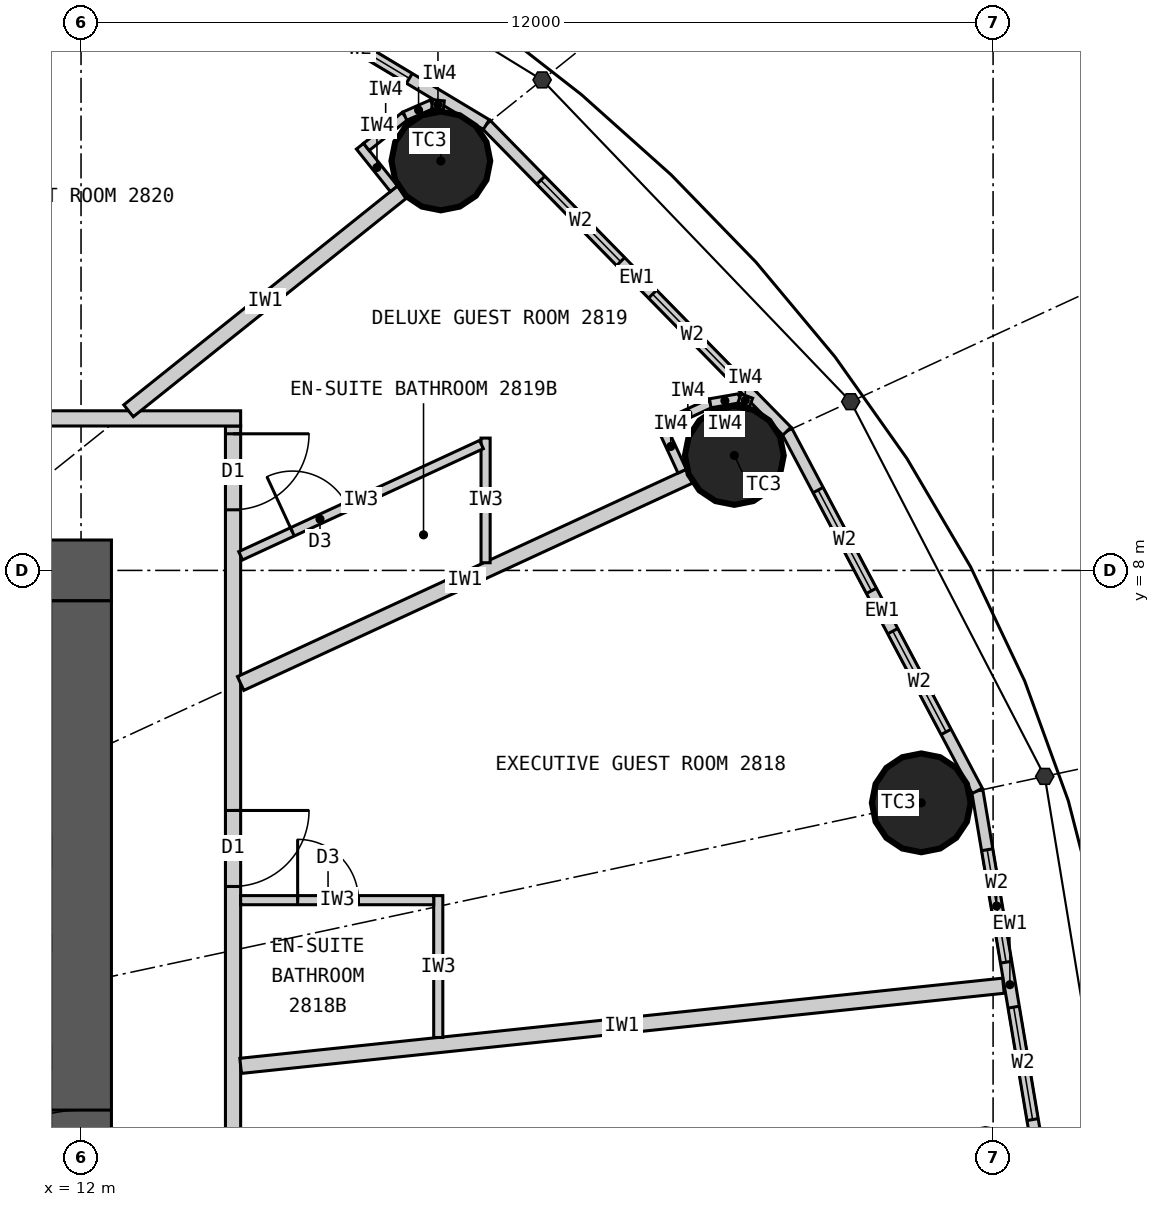
"""IFC4 building model, lengths in metres.
Left out: names, types, materials, properties, quantities, classifications, styles, units other than length and angle.
Written with IfcOpenShell. Run it as: python <this file> out.ifc"""

import sys

from ifc_helpers import new_model, si_unit, direction, frame, frame_2d, origin, origin_2d, place, context, subcontext, project, spatial, rectangle, circle, extrude, element, fill, save


model = new_model("IFC4")
c1 = context("Model", 3, precision=1e-05, world=origin(), true_north=direction((0.0, 1.0)))
c2 = subcontext(c1, "Body", "Model", "MODEL_VIEW")
j1 = project(units=[si_unit("LENGTHUNIT", "METRE"), si_unit("PLANEANGLEUNIT", "RADIAN")], contexts=[c1])
p1 = place(None, origin())
s1 = spatial("IfcSite", under=j1, at=p1, CompositionType="ELEMENT")
p2 = place(p1, origin())
s2 = spatial("IfcBuilding", under=s1, at=p2, CompositionType="ELEMENT")
p3 = place(p2, frame((0.0, 0.0, 112.2)))
s3 = spatial("IfcBuildingStorey", under=s2, at=p3, CompositionType="ELEMENT", Elevation=112.2)
for number, where, z_axis, x_axis in (
    (1, (23.055, 4.942, 0.0), (0.0, 0.0, 1.0), (1.0, 0.0, 0.0)),
    (2, (20.596, 9.513, 0.0), (0.0, 0.0, 1.0), (1.0, 0.0, 0.0)),
    (3, (16.734, 13.387, 0.0), (0.0, 0.0, 1.0), (1.0, 0.0, 0.0)),
):
    element("IfcColumn", number, at=place(p3, frame(where, z_axis=z_axis, x_axis=x_axis)), inside=s3, PredefinedType="COLUMN", context=c2, shape_type="SweptSolid", body=[
        extrude(circle(Radius=0.65, at=origin_2d()), origin(), (0.0, 0.0, 1.0), 3.3),
    ])
p4 = place(p3, frame((-12.4, 8.0, 0.0), z_axis=(0.0, 0.0, 1.0), x_axis=(1.0, 0.0, 0.0)))
e4 = element("IfcWall", 4, at=p4, inside=s3, PredefinedType="SHEAR", context=c2, shape_type="SweptSolid", body=[
    extrude(rectangle(XDim=24.8, YDim=0.8, at=frame_2d((12.4, 0.0))), origin(), (0.0, 0.0, 1.0), 3.3),
])
p5 = place(p4, frame((11.1, 0.0, 0.0)))
e5 = element("IfcOpeningElement", 5, at=p5, cuts=e4, PredefinedType="OPENING", context=c2, shape_type="SweptSolid", body=[
    extrude(rectangle(XDim=1.2, YDim=2.2, at=frame_2d((0.6, 1.1))), frame((0.0, 0.41, 0.0), z_axis=(0.0, -1.0, 0.0), x_axis=(1.0, 0.0, 0.0)), (0.0, 0.0, 1.0), 0.82),
])
p6 = place(p4, frame((18.7, 0.0, 0.0)))
e6 = element("IfcOpeningElement", 6, at=p6, cuts=e4, PredefinedType="OPENING", context=c2, shape_type="SweptSolid", body=[
    extrude(rectangle(XDim=0.9, YDim=2.2, at=frame_2d((0.45, 1.1))), frame((0.0, 0.41, 0.0), z_axis=(0.0, -1.0, 0.0), x_axis=(1.0, 0.0, 0.0)), (0.0, 0.0, 1.0), 0.82),
])
p7 = place(p3, frame((12.0, -7.6, 0.0), z_axis=(0.0, 0.0, 1.0), x_axis=(0.0, 1.0, 0.0)))
e7 = element("IfcWall", 7, at=p7, inside=s3, PredefinedType="SHEAR", context=c2, shape_type="SweptSolid", body=[
    extrude(rectangle(XDim=15.2, YDim=0.8, at=frame_2d((7.6, 0.0))), origin(), (0.0, 0.0, 1.0), 3.3),
])
p8 = place(p7, frame((6.7, 0.0, 0.0)))
e8 = element("IfcOpeningElement", 8, at=p8, cuts=e7, PredefinedType="OPENING", context=c2, shape_type="SweptSolid", body=[
    extrude(rectangle(XDim=1.8, YDim=2.2, at=frame_2d((0.9, 1.1))), frame((0.0, 0.41, 0.0), z_axis=(0.0, -1.0, 0.0), x_axis=(1.0, 0.0, 0.0)), (0.0, 0.0, 1.0), 0.82),
])
p9 = place(p3, frame((24.65, 0.0, 0.0), z_axis=(0.0, 0.0, 1.0), x_axis=(-0.165883894218, 0.986145290329, 0.0)))
e9 = element("IfcWall", 9, at=p9, inside=s3, PredefinedType="ELEMENTEDWALL", context=c2, shape_type="SweptSolid", body=[
    extrude(rectangle(XDim=5.172, YDim=0.15, at=frame_2d((2.586, 0.0))), origin(), (0.0, 0.0, 1.0), 3.12),
])
p10 = place(p9, frame((0.786, 0.0, 0.9)))
e10 = element("IfcOpeningElement", 10, at=p10, cuts=e9, PredefinedType="OPENING", context=c2, shape_type="SweptSolid", body=[
    extrude(rectangle(XDim=1.5, YDim=1.9, at=frame_2d((0.75, 0.95))), frame((0.0, 0.085, 0.0), z_axis=(0.0, -1.0, 0.0), x_axis=(1.0, 0.0, 0.0)), (0.0, 0.0, 1.0), 0.17),
])
p11 = place(p9, frame((2.886, 0.0, 0.9)))
e11 = element("IfcOpeningElement", 11, at=p11, cuts=e9, PredefinedType="OPENING", context=c2, shape_type="SweptSolid", body=[
    extrude(rectangle(XDim=1.5, YDim=1.9, at=frame_2d((0.75, 0.95))), frame((0.0, 0.085, 0.0), z_axis=(0.0, -1.0, 0.0), x_axis=(1.0, 0.0, 0.0)), (0.0, 0.0, 1.0), 0.17),
])
p12 = place(p3, frame((23.792, 5.1, 0.0), z_axis=(0.0, 0.0, 1.0), x_axis=(-0.467814388454, 0.883826735257, 0.0)))
e12 = element("IfcWall", 12, at=p12, inside=s3, PredefinedType="ELEMENTEDWALL", context=c2, shape_type="SweptSolid", body=[
    extrude(rectangle(XDim=5.354, YDim=0.15, at=frame_2d((2.677, 0.0))), origin(), (0.0, 0.0, 1.0), 3.12),
])
p13 = place(p12, frame((0.877, 0.0, 0.9)))
e13 = element("IfcOpeningElement", 13, at=p13, cuts=e12, PredefinedType="OPENING", context=c2, shape_type="SweptSolid", body=[
    extrude(rectangle(XDim=1.5, YDim=1.9, at=frame_2d((0.75, 0.95))), frame((0.0, 0.085, 0.0), z_axis=(0.0, -1.0, 0.0), x_axis=(1.0, 0.0, 0.0)), (0.0, 0.0, 1.0), 0.17),
])
p14 = place(p12, frame((2.977, 0.0, 0.9)))
e14 = element("IfcOpeningElement", 14, at=p14, cuts=e12, PredefinedType="OPENING", context=c2, shape_type="SweptSolid", body=[
    extrude(rectangle(XDim=1.5, YDim=1.9, at=frame_2d((0.75, 0.95))), frame((0.0, 0.085, 0.0), z_axis=(0.0, -1.0, 0.0), x_axis=(1.0, 0.0, 0.0)), (0.0, 0.0, 1.0), 0.17),
])
p15 = place(p3, frame((21.287, 9.832, 0.0), z_axis=(0.0, 0.0, 1.0), x_axis=(-0.700136650834, 0.714008872605, 0.0)))
e15 = element("IfcWall", 15, at=p15, inside=s3, PredefinedType="ELEMENTEDWALL", context=c2, shape_type="SweptSolid", body=[
    extrude(rectangle(XDim=5.649, YDim=0.15, at=frame_2d((2.825, 0.0))), origin(), (0.0, 0.0, 1.0), 3.12),
])
p16 = place(p15, frame((1.025, 0.0, 0.9)))
e16 = element("IfcOpeningElement", 16, at=p16, cuts=e15, PredefinedType="OPENING", context=c2, shape_type="SweptSolid", body=[
    extrude(rectangle(XDim=1.5, YDim=1.9, at=frame_2d((0.75, 0.95))), frame((0.0, 0.085, 0.0), z_axis=(0.0, -1.0, 0.0), x_axis=(1.0, 0.0, 0.0)), (0.0, 0.0, 1.0), 0.17),
])
p17 = place(p15, frame((3.125, 0.0, 0.9)))
e17 = element("IfcOpeningElement", 17, at=p17, cuts=e15, PredefinedType="OPENING", context=c2, shape_type="SweptSolid", body=[
    extrude(rectangle(XDim=1.5, YDim=1.9, at=frame_2d((0.75, 0.95))), frame((0.0, 0.085, 0.0), z_axis=(0.0, -1.0, 0.0), x_axis=(1.0, 0.0, 0.0)), (0.0, 0.0, 1.0), 0.17),
])
p18 = place(p3, frame((17.332, 13.866, 0.0), z_axis=(0.0, 0.0, 1.0), x_axis=(-0.857308573723, 0.514802884044, 0.0)))
e18 = element("IfcWall", 18, at=p18, inside=s3, PredefinedType="ELEMENTEDWALL", context=c2, shape_type="SweptSolid", body=[
    extrude(rectangle(XDim=5.961, YDim=0.15, at=frame_2d((2.98, 0.0))), origin(), (0.0, 0.0, 1.0), 3.12),
])
p19 = place(p18, frame((1.181, 0.0, 0.9)))
e19 = element("IfcOpeningElement", 19, at=p19, cuts=e18, PredefinedType="OPENING", context=c2, shape_type="SweptSolid", body=[
    extrude(rectangle(XDim=1.5, YDim=1.9, at=frame_2d((0.75, 0.95))), frame((0.0, 0.085, 0.0), z_axis=(0.0, -1.0, 0.0), x_axis=(1.0, 0.0, 0.0)), (0.0, 0.0, 1.0), 0.17),
])
p20 = place(p18, frame((3.281, 0.0, 0.9)))
e20 = element("IfcOpeningElement", 20, at=p20, cuts=e18, PredefinedType="OPENING", context=c2, shape_type="SweptSolid", body=[
    extrude(rectangle(XDim=1.5, YDim=1.9, at=frame_2d((0.75, 0.95))), frame((0.0, 0.085, 0.0), z_axis=(0.0, -1.0, 0.0), x_axis=(1.0, 0.0, 0.0)), (0.0, 0.0, 1.0), 0.17),
])
p21 = place(p3, frame((14.0, -9.9, 0.0), z_axis=(0.0, 0.0, 1.0), x_axis=(0.0, 1.0, 0.0)))
e21 = element("IfcWall", 21, at=p21, inside=s3, PredefinedType="PARTITIONING", context=c2, shape_type="SweptSolid", body=[
    extrude(rectangle(XDim=19.8, YDim=0.2, at=frame_2d((9.9, 0.0))), origin(), (0.0, 0.0, 1.0), 3.12),
])
p22 = place(p21, frame((3.318, 0.0, 0.0)))
e22 = element("IfcOpeningElement", 22, at=p22, cuts=e21, PredefinedType="OPENING", context=c2, shape_type="SweptSolid", body=[
    extrude(rectangle(XDim=1.0, YDim=2.2, at=frame_2d((0.5, 1.1))), frame((0.0, 0.11, 0.0), z_axis=(0.0, -1.0, 0.0), x_axis=(1.0, 0.0, 0.0)), (0.0, 0.0, 1.0), 0.22),
])
p23 = place(p21, frame((9.238, 0.0, 0.0)))
e23 = element("IfcOpeningElement", 23, at=p23, cuts=e21, PredefinedType="OPENING", context=c2, shape_type="SweptSolid", body=[
    extrude(rectangle(XDim=1.0, YDim=2.2, at=frame_2d((0.5, 1.1))), frame((0.0, 0.11, 0.0), z_axis=(0.0, -1.0, 0.0), x_axis=(1.0, 0.0, 0.0)), (0.0, 0.0, 1.0), 0.22),
])
p24 = place(p21, frame((13.742, 0.0, 0.0)))
e24 = element("IfcOpeningElement", 24, at=p24, cuts=e21, PredefinedType="OPENING", context=c2, shape_type="SweptSolid", body=[
    extrude(rectangle(XDim=1.0, YDim=2.2, at=frame_2d((0.5, 1.1))), frame((0.0, 0.11, 0.0), z_axis=(0.0, -1.0, 0.0), x_axis=(1.0, 0.0, 0.0)), (0.0, 0.0, 1.0), 0.22),
])
p25 = place(p21, frame((18.698, 0.0, 0.0)))
e25 = element("IfcOpeningElement", 25, at=p25, cuts=e21, PredefinedType="OPENING", context=c2, shape_type="SweptSolid", body=[
    extrude(rectangle(XDim=1.0, YDim=2.2, at=frame_2d((0.5, 1.1))), frame((0.0, 0.11, 0.0), z_axis=(0.0, -1.0, 0.0), x_axis=(1.0, 0.0, 0.0)), (0.0, 0.0, 1.0), 0.22),
])
p26 = place(p3, frame((5.139, 10.0, 0.0), z_axis=(0.0, 0.0, 1.0), x_axis=(1.0, 0.0, 0.0)))
e26 = element("IfcWall", 26, at=p26, inside=s3, PredefinedType="PARTITIONING", context=c2, shape_type="SweptSolid", body=[
    extrude(rectangle(XDim=8.961, YDim=0.2, at=frame_2d((4.48, 0.0))), origin(), (0.0, 0.0, 1.0), 3.12),
])
p27 = place(p3, frame((14.1, 1.482, 0.0), z_axis=(0.0, 0.0, 1.0), x_axis=(0.994523202615, 0.104516024894, 0.0)))
e27 = element("IfcWall", 27, at=p27, inside=s3, PredefinedType="PARTITIONING", context=c2, shape_type="SweptSolid", body=[
    extrude(rectangle(XDim=10.091, YDim=0.2, at=frame_2d((5.045, 0.0))), origin(), (0.0, 0.0, 1.0), 2.47),
])
p28 = place(p3, frame((14.1, 6.512, 0.0), z_axis=(0.0, 0.0, 1.0), x_axis=(0.907833019998, 0.419331858797, 0.0)))
e28 = element("IfcWall", 28, at=p28, inside=s3, PredefinedType="PARTITIONING", context=c2, shape_type="SweptSolid", body=[
    extrude(rectangle(XDim=6.505, YDim=0.2, at=frame_2d((3.252, 0.0))), origin(), (0.0, 0.0, 1.0), 2.27),
])
p29 = place(p3, frame((12.625, 10.1, 0.0), z_axis=(0.0, 0.0, 1.0), x_axis=(0.780863644897, 0.624701503182, 0.0)))
e29 = element("IfcWall", 29, at=p29, inside=s3, PredefinedType="PARTITIONING", context=c2, shape_type="SweptSolid", body=[
    extrude(rectangle(XDim=4.612, YDim=0.2, at=frame_2d((2.306, 0.0))), origin(), (0.0, 0.0, 1.0), 2.37),
])
p30 = place(p3, frame((16.7, 1.855, 0.0), z_axis=(0.0, 0.0, 1.0), x_axis=(0.0, 1.0, 0.0)))
e30 = element("IfcWall", 30, at=p30, inside=s3, PredefinedType="PARTITIONING", context=c2, shape_type="SweptSolid", body=[
    extrude(rectangle(XDim=1.867, YDim=0.12, at=frame_2d((0.933, 0.0))), origin(), (0.0, 0.0, 1.0), 3.12),
])
p31 = place(p3, frame((14.1, 3.662, 0.0), z_axis=(0.0, 0.0, 1.0), x_axis=(1.0, 0.0, 0.0)))
e31 = element("IfcWall", 31, at=p31, inside=s3, PredefinedType="PARTITIONING", context=c2, shape_type="SweptSolid", body=[
    extrude(rectangle(XDim=2.54, YDim=0.12, at=frame_2d((1.27, 0.0))), origin(), (0.0, 0.0, 1.0), 2.37),
])
p32 = place(p31, frame((0.75, 0.0, 0.0)))
e32 = element("IfcOpeningElement", 32, at=p32, cuts=e31, PredefinedType="OPENING", context=c2, shape_type="SweptSolid", body=[
    extrude(rectangle(XDim=0.8, YDim=2.1, at=frame_2d((0.4, 1.05))), frame((0.0, 0.07, 0.0), z_axis=(0.0, -1.0, 0.0), x_axis=(1.0, 0.0, 0.0)), (0.0, 0.0, 1.0), 0.14),
])
p33 = place(p3, frame((17.323, 8.101, 0.0), z_axis=(0.0, 0.0, 1.0), x_axis=(0.0, 1.0, 0.0)))
e33 = element("IfcWall", 33, at=p33, inside=s3, PredefinedType="PARTITIONING", context=c2, shape_type="SweptSolid", body=[
    extrude(rectangle(XDim=1.64, YDim=0.12, at=frame_2d((0.82, 0.0))), origin(), (0.0, 0.0, 1.0), 3.12),
])
p34 = place(p3, frame((14.1, 8.193, 0.0), z_axis=(0.0, 0.0, 1.0), x_axis=(0.907836493557, 0.419324338628, 0.0)))
e34 = element("IfcWall", 34, at=p34, inside=s3, PredefinedType="PARTITIONING", context=c2, shape_type="SweptSolid", body=[
    extrude(rectangle(XDim=3.49, YDim=0.12, at=frame_2d((1.745, 0.0))), origin(), (0.0, 0.0, 1.0), 3.12),
])
p35 = place(p34, frame((0.75, 0.0, 0.0)))
e35 = element("IfcOpeningElement", 35, at=p35, cuts=e34, PredefinedType="OPENING", context=c2, shape_type="SweptSolid", body=[
    extrude(rectangle(XDim=0.8, YDim=2.1, at=frame_2d((0.4, 1.05))), frame((0.0, 0.07, 0.0), z_axis=(0.0, -1.0, 0.0), x_axis=(1.0, 0.0, 0.0)), (0.0, 0.0, 1.0), 0.14),
])
p36 = place(p3, frame((19.909, 9.306, 0.0), z_axis=(0.0, 0.0, 1.0), x_axis=(-0.419296148934, 0.90784951368, 0.0)))
e36 = element("IfcWall", 36, at=p36, inside=s3, PredefinedType="PARTITIONING", context=c2, shape_type="SweptSolid", body=[
    extrude(rectangle(XDim=0.716, YDim=0.12, at=frame_2d((0.358, 0.0))), origin(), (0.0, 0.0, 1.0), 3.12),
])
p37 = place(p3, frame((19.689, 9.926, 0.0), z_axis=(0.0, 0.0, 1.0), x_axis=(0.907893409272, 0.419201094227, 0.0)))
e37 = element("IfcWall", 37, at=p37, inside=s3, PredefinedType="PARTITIONING", context=c2, shape_type="SweptSolid", body=[
    extrude(rectangle(XDim=0.65, YDim=0.12, at=frame_2d((0.325, 0.0))), origin(), (0.0, 0.0, 1.0), 3.12),
])
p38 = place(p3, frame((20.279, 10.199, 0.0), z_axis=(0.0, 0.0, 1.0), x_axis=(0.985380740712, 0.170366651181, 0.0)))
e38 = element("IfcWall", 38, at=p38, inside=s3, PredefinedType="PARTITIONING", context=c2, shape_type="SweptSolid", body=[
    extrude(rectangle(XDim=0.391, YDim=0.12, at=frame_2d((0.196, 0.0))), origin(), (0.0, 0.0, 1.0), 3.12),
])
p39 = place(p3, frame((20.664, 10.265, 0.0), z_axis=(0.0, 0.0, 1.0), x_axis=(0.938058651481, -0.346476501918, 0.0)))
e39 = element("IfcWall", 39, at=p39, inside=s3, PredefinedType="PARTITIONING", context=c2, shape_type="SweptSolid", body=[
    extrude(rectangle(XDim=0.161, YDim=0.12, at=frame_2d((0.081, 0.0))), origin(), (0.0, 0.0, 1.0), 3.12),
])
p40 = place(p3, frame((16.117, 13.022, 0.0), z_axis=(0.0, 0.0, 1.0), x_axis=(-0.62465344249, 0.780902091677, 0.0)))
e40 = element("IfcWall", 40, at=p40, inside=s3, PredefinedType="PARTITIONING", context=c2, shape_type="SweptSolid", body=[
    extrude(rectangle(XDim=0.716, YDim=0.12, at=frame_2d((0.358, 0.0))), origin(), (0.0, 0.0, 1.0), 3.12),
])
p41 = place(p3, frame((15.754, 13.571, 0.0), z_axis=(0.0, 0.0, 1.0), x_axis=(0.780905453553, 0.624649239663, 0.0)))
e41 = element("IfcWall", 41, at=p41, inside=s3, PredefinedType="PARTITIONING", context=c2, shape_type="SweptSolid", body=[
    extrude(rectangle(XDim=0.65, YDim=0.12, at=frame_2d((0.325, 0.0))), origin(), (0.0, 0.0, 1.0), 3.12),
])
p42 = place(p3, frame((16.262, 13.977, 0.0), z_axis=(0.0, 0.0, 1.0), x_axis=(0.915985403703, 0.401211590314, 0.0)))
e42 = element("IfcWall", 42, at=p42, inside=s3, PredefinedType="PARTITIONING", context=c2, shape_type="SweptSolid", body=[
    extrude(rectangle(XDim=0.391, YDim=0.12, at=frame_2d((0.196, 0.0))), origin(), (0.0, 0.0, 1.0), 3.12),
])
p43 = place(p3, frame((16.62, 14.134, 0.0), z_axis=(0.0, 0.0, 1.0), x_axis=(0.993941871493, -0.109907033867, 0.0)))
e43 = element("IfcWall", 43, at=p43, inside=s3, PredefinedType="PARTITIONING", context=c2, shape_type="SweptSolid", body=[
    extrude(rectangle(XDim=0.153, YDim=0.12, at=frame_2d((0.077, 0.0))), origin(), (0.0, 0.0, 1.0), 3.12),
])
p44 = place(p10, origin())
e44 = element("IfcWindow", 44, at=p44, inside=s3, PartitioningType="SINGLE_PANEL", PredefinedType="WINDOW", context=c2, shape_type="SweptSolid", body=[
    extrude(rectangle(XDim=1.5, YDim=1.9, at=frame_2d((0.75, 0.95))), frame((0.0, 0.03, 0.0), z_axis=(0.0, -1.0, 0.0), x_axis=(1.0, 0.0, 0.0)), (0.0, 0.0, 1.0), 0.06),
])
fill(e10, e44)
p45 = place(p11, origin())
e45 = element("IfcWindow", 45, at=p45, inside=s3, PartitioningType="SINGLE_PANEL", PredefinedType="WINDOW", context=c2, shape_type="SweptSolid", body=[
    extrude(rectangle(XDim=1.5, YDim=1.9, at=frame_2d((0.75, 0.95))), frame((0.0, 0.03, 0.0), z_axis=(0.0, -1.0, 0.0), x_axis=(1.0, 0.0, 0.0)), (0.0, 0.0, 1.0), 0.06),
])
fill(e11, e45)
p46 = place(p13, origin())
e46 = element("IfcWindow", 46, at=p46, inside=s3, PartitioningType="SINGLE_PANEL", PredefinedType="WINDOW", context=c2, shape_type="SweptSolid", body=[
    extrude(rectangle(XDim=1.5, YDim=1.9, at=frame_2d((0.75, 0.95))), frame((0.0, 0.03, 0.0), z_axis=(0.0, -1.0, 0.0), x_axis=(1.0, 0.0, 0.0)), (0.0, 0.0, 1.0), 0.06),
])
fill(e13, e46)
p47 = place(p14, origin())
e47 = element("IfcWindow", 47, at=p47, inside=s3, PartitioningType="SINGLE_PANEL", PredefinedType="WINDOW", context=c2, shape_type="SweptSolid", body=[
    extrude(rectangle(XDim=1.5, YDim=1.9, at=frame_2d((0.75, 0.95))), frame((0.0, 0.03, 0.0), z_axis=(0.0, -1.0, 0.0), x_axis=(1.0, 0.0, 0.0)), (0.0, 0.0, 1.0), 0.06),
])
fill(e14, e47)
p48 = place(p16, origin())
e48 = element("IfcWindow", 48, at=p48, inside=s3, PartitioningType="SINGLE_PANEL", PredefinedType="WINDOW", context=c2, shape_type="SweptSolid", body=[
    extrude(rectangle(XDim=1.5, YDim=1.9, at=frame_2d((0.75, 0.95))), frame((0.0, 0.03, 0.0), z_axis=(0.0, -1.0, 0.0), x_axis=(1.0, 0.0, 0.0)), (0.0, 0.0, 1.0), 0.06),
])
fill(e16, e48)
p49 = place(p17, origin())
e49 = element("IfcWindow", 49, at=p49, inside=s3, PartitioningType="SINGLE_PANEL", PredefinedType="WINDOW", context=c2, shape_type="SweptSolid", body=[
    extrude(rectangle(XDim=1.5, YDim=1.9, at=frame_2d((0.75, 0.95))), frame((0.0, 0.03, 0.0), z_axis=(0.0, -1.0, 0.0), x_axis=(1.0, 0.0, 0.0)), (0.0, 0.0, 1.0), 0.06),
])
fill(e17, e49)
p50 = place(p19, origin())
e50 = element("IfcWindow", 50, at=p50, inside=s3, PartitioningType="SINGLE_PANEL", PredefinedType="WINDOW", context=c2, shape_type="SweptSolid", body=[
    extrude(rectangle(XDim=1.5, YDim=1.9, at=frame_2d((0.75, 0.95))), frame((0.0, 0.03, 0.0), z_axis=(0.0, -1.0, 0.0), x_axis=(1.0, 0.0, 0.0)), (0.0, 0.0, 1.0), 0.06),
])
fill(e19, e50)
p51 = place(p32, origin())
e51 = element("IfcDoor", 51, at=p51, inside=s3, OperationType="SINGLE_SWING_LEFT", PredefinedType="DOOR", context=c2, shape_type="SweptSolid", body=[
    extrude(rectangle(XDim=0.8, YDim=2.1, at=frame_2d((0.4, 1.05))), frame((0.0, 0.025, 0.0), z_axis=(0.0, -1.0, 0.0), x_axis=(1.0, 0.0, 0.0)), (0.0, 0.0, 1.0), 0.05),
])
fill(e32, e51)
p52 = place(p24, origin())
e52 = element("IfcDoor", 52, at=p52, inside=s3, OperationType="SINGLE_SWING_RIGHT", PredefinedType="DOOR", context=c2, shape_type="SweptSolid", body=[
    extrude(rectangle(XDim=1.0, YDim=2.2, at=frame_2d((0.5, 1.1))), frame((0.0, 0.025, 0.0), z_axis=(0.0, -1.0, 0.0), x_axis=(1.0, 0.0, 0.0)), (0.0, 0.0, 1.0), 0.05),
])
fill(e24, e52)
p53 = place(p35, origin())
e53 = element("IfcDoor", 53, at=p53, inside=s3, OperationType="SINGLE_SWING_LEFT", PredefinedType="DOOR", context=c2, shape_type="SweptSolid", body=[
    extrude(rectangle(XDim=0.8, YDim=2.1, at=frame_2d((0.4, 1.05))), frame((0.0, 0.025, 0.0), z_axis=(0.0, -1.0, 0.0), x_axis=(1.0, 0.0, 0.0)), (0.0, 0.0, 1.0), 0.05),
])
fill(e35, e53)
p54 = place(p25, origin())
e54 = element("IfcDoor", 54, at=p54, inside=s3, OperationType="SINGLE_SWING_RIGHT", PredefinedType="DOOR", context=c2, shape_type="SweptSolid", body=[
    extrude(rectangle(XDim=1.0, YDim=2.2, at=frame_2d((0.5, 1.1))), frame((0.0, 0.025, 0.0), z_axis=(0.0, -1.0, 0.0), x_axis=(1.0, 0.0, 0.0)), (0.0, 0.0, 1.0), 0.05),
])
fill(e25, e54)
p55 = place(p8, origin())
e55 = element("IfcDoor", 55, at=p55, inside=s3, OperationType="DOUBLE_DOOR_DOUBLE_SWING", PredefinedType="DOOR", context=c2, shape_type="SweptSolid", body=[
    extrude(rectangle(XDim=1.8, YDim=2.2, at=frame_2d((0.9, 1.1))), frame((0.0, 0.025, 0.0), z_axis=(0.0, -1.0, 0.0), x_axis=(1.0, 0.0, 0.0)), (0.0, 0.0, 1.0), 0.05),
])
fill(e8, e55)
save(model, sys.argv[1])
